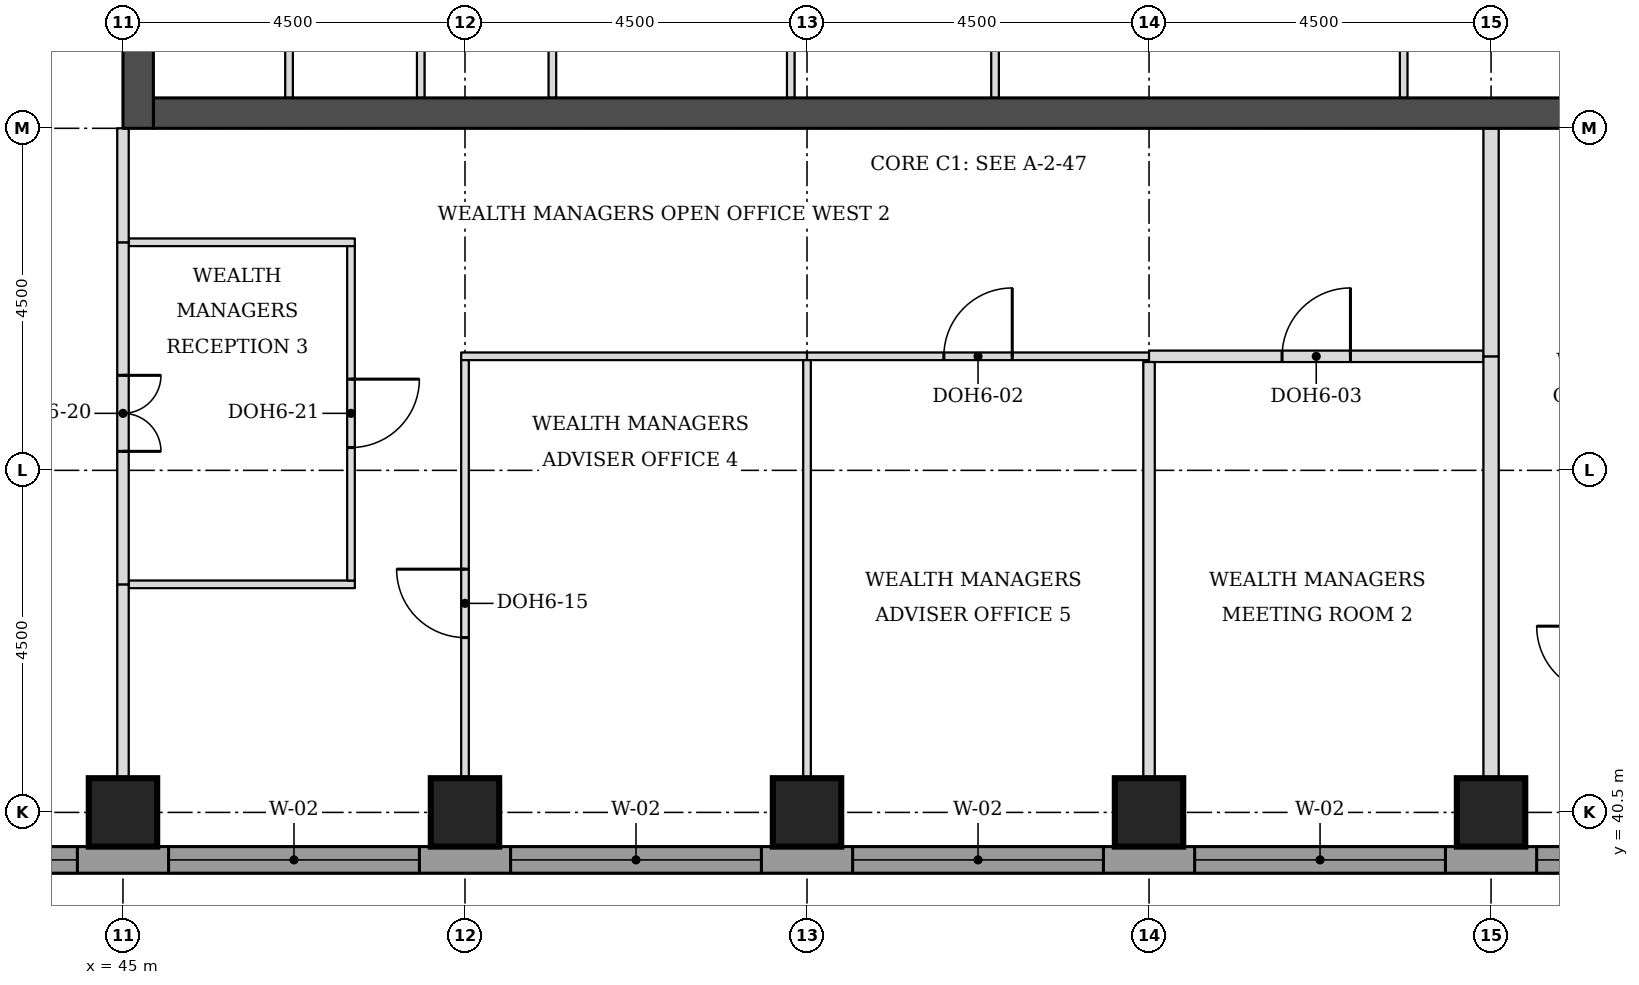
"""IFC4 building model, lengths in metres.
Left out: names, types, materials, properties, quantities, classifications, styles, units other than length and angle.
Written with IfcOpenShell. Run it as: python <this file> out.ifc"""

import sys

from ifc_helpers import new_model, si_unit, direction, frame, frame_2d, origin, origin_2d, place, context, subcontext, project, spatial, rectangle, extrude, element, fill, save


model = new_model("IFC4")
c1 = context("Model", 3, precision=1e-05, world=origin(), true_north=direction((0.0, 1.0)))
c2 = subcontext(c1, "Body", "Model", "MODEL_VIEW")
j1 = project(units=[si_unit("LENGTHUNIT", "METRE"), si_unit("PLANEANGLEUNIT", "RADIAN")], contexts=[c1])
p1 = place(None, origin())
s1 = spatial("IfcSite", under=j1, at=p1, CompositionType="ELEMENT")
p2 = place(p1, origin())
s2 = spatial("IfcBuilding", under=s1, at=p2, CompositionType="ELEMENT")
p3 = place(p2, frame((0.0, 0.0, 188.4)))
s3 = spatial("IfcBuildingStorey", under=s2, at=p3, CompositionType="ELEMENT", Elevation=188.4)
for number, where, z_axis, x_axis in (
    (1, (45.0, 40.5, 0.0), (0.0, 0.0, 1.0), (1.0, 0.0, 0.0)),
    (2, (49.5, 40.5, 0.0), (0.0, 0.0, 1.0), (1.0, 0.0, 0.0)),
    (3, (54.0, 40.5, 0.0), (0.0, 0.0, 1.0), (1.0, 0.0, 0.0)),
    (4, (58.5, 40.5, 0.0), (0.0, 0.0, 1.0), (1.0, 0.0, 0.0)),
    (5, (63.0, 40.5, 0.0), (0.0, 0.0, 1.0), (1.0, 0.0, 0.0)),
):
    element("IfcColumn", number, at=place(p3, frame(where, z_axis=z_axis, x_axis=x_axis)), inside=s3, PredefinedType="COLUMN", context=c2, shape_type="SweptSolid", body=[
        extrude(rectangle(XDim=0.9, YDim=0.9, at=origin_2d()), origin(), (0.0, 0.0, 1.0), 3.7),
    ])
p4 = place(p3, frame((45.4, 49.7, 0.0), z_axis=(0.0, 0.0, 1.0), x_axis=(1.0, 0.0, 0.0)))
e6 = element("IfcWall", 6, at=p4, inside=s3, PredefinedType="SHEAR", context=c2, shape_type="SweptSolid", body=[
    extrude(rectangle(XDim=21.7, YDim=0.4, at=frame_2d((10.85, 0.0))), origin(), (0.0, 0.0, 1.0), 3.7),
])
p5 = place(p3, frame((45.2, 49.5, 0.0), z_axis=(0.0, 0.0, 1.0), x_axis=(0.0, 1.0, 0.0)))
e7 = element("IfcWall", 7, at=p5, inside=s3, PredefinedType="SHEAR", context=c2, shape_type="SweptSolid", body=[
    extrude(rectangle(XDim=22.5, YDim=0.4, at=frame_2d((11.25, 0.0))), origin(), (0.0, 0.0, 1.0), 3.7),
])
p6 = place(p5, frame((4.2, 0.0, 0.0)))
e8 = element("IfcOpeningElement", 8, at=p6, cuts=e7, PredefinedType="OPENING", context=c2, shape_type="SweptSolid", body=[
    extrude(rectangle(XDim=1.8, YDim=2.1, at=frame_2d((0.9, 1.05))), frame((0.0, 0.21, 0.0), z_axis=(0.0, -1.0, 0.0), x_axis=(1.0, 0.0, 0.0)), (0.0, 0.0, 1.0), 0.42),
])
p7 = place(p5, frame((6.9, 0.0, 0.0)))
e9 = element("IfcOpeningElement", 9, at=p7, cuts=e7, PredefinedType="OPENING", context=c2, shape_type="SweptSolid", body=[
    extrude(rectangle(XDim=1.1, YDim=2.1, at=frame_2d((0.55, 1.05))), frame((0.0, 0.21, 0.0), z_axis=(0.0, -1.0, 0.0), x_axis=(1.0, 0.0, 0.0)), (0.0, 0.0, 1.0), 0.42),
])
p8 = place(p5, frame((13.6, 0.0, 0.0)))
e10 = element("IfcOpeningElement", 10, at=p8, cuts=e7, PredefinedType="OPENING", context=c2, shape_type="SweptSolid", body=[
    extrude(rectangle(XDim=1.1, YDim=2.1, at=frame_2d((0.55, 1.05))), frame((0.0, 0.21, 0.0), z_axis=(0.0, -1.0, 0.0), x_axis=(1.0, 0.0, 0.0)), (0.0, 0.0, 1.0), 0.42),
])
p9 = place(p5, frame((16.5, 0.0, 0.0)))
e11 = element("IfcOpeningElement", 11, at=p9, cuts=e7, PredefinedType="OPENING", context=c2, shape_type="SweptSolid", body=[
    extrude(rectangle(XDim=1.8, YDim=2.1, at=frame_2d((0.9, 1.05))), frame((0.0, 0.21, 0.0), z_axis=(0.0, -1.0, 0.0), x_axis=(1.0, 0.0, 0.0)), (0.0, 0.0, 1.0), 0.42),
])
p10 = place(p3, frame((36.0, 39.875, 0.0), z_axis=(0.0, 0.0, 1.0), x_axis=(1.0, 0.0, 0.0)))
e12 = element("IfcWall", 12, at=p10, inside=s3, PredefinedType="STANDARD", context=c2, shape_type="SweptSolid", body=[
    extrude(rectangle(XDim=36.331, YDim=0.35, at=frame_2d((18.166, 0.0))), origin(), (0.0, 0.0, 1.0), 3.525),
])
p11 = place(p10, frame((5.1, 0.0, 0.9)))
e13 = element("IfcOpeningElement", 13, at=p11, cuts=e12, PredefinedType="OPENING", context=c2, shape_type="SweptSolid", body=[
    extrude(rectangle(XDim=3.3, YDim=1.9, at=frame_2d((1.65, 0.95))), frame((0.0, 0.185, 0.0), z_axis=(0.0, -1.0, 0.0), x_axis=(1.0, 0.0, 0.0)), (0.0, 0.0, 1.0), 0.37),
])
p12 = place(p10, frame((9.6, 0.0, 0.9)))
e14 = element("IfcOpeningElement", 14, at=p12, cuts=e12, PredefinedType="OPENING", context=c2, shape_type="SweptSolid", body=[
    extrude(rectangle(XDim=3.3, YDim=1.9, at=frame_2d((1.65, 0.95))), frame((0.0, 0.185, 0.0), z_axis=(0.0, -1.0, 0.0), x_axis=(1.0, 0.0, 0.0)), (0.0, 0.0, 1.0), 0.37),
])
p13 = place(p10, frame((14.1, 0.0, 0.9)))
e15 = element("IfcOpeningElement", 15, at=p13, cuts=e12, PredefinedType="OPENING", context=c2, shape_type="SweptSolid", body=[
    extrude(rectangle(XDim=3.3, YDim=1.9, at=frame_2d((1.65, 0.95))), frame((0.0, 0.185, 0.0), z_axis=(0.0, -1.0, 0.0), x_axis=(1.0, 0.0, 0.0)), (0.0, 0.0, 1.0), 0.37),
])
p14 = place(p10, frame((18.6, 0.0, 0.9)))
e16 = element("IfcOpeningElement", 16, at=p14, cuts=e12, PredefinedType="OPENING", context=c2, shape_type="SweptSolid", body=[
    extrude(rectangle(XDim=3.3, YDim=1.9, at=frame_2d((1.65, 0.95))), frame((0.0, 0.185, 0.0), z_axis=(0.0, -1.0, 0.0), x_axis=(1.0, 0.0, 0.0)), (0.0, 0.0, 1.0), 0.37),
])
p15 = place(p10, frame((23.1, 0.0, 0.9)))
e17 = element("IfcOpeningElement", 17, at=p15, cuts=e12, PredefinedType="OPENING", context=c2, shape_type="SweptSolid", body=[
    extrude(rectangle(XDim=3.3, YDim=1.9, at=frame_2d((1.65, 0.95))), frame((0.0, 0.185, 0.0), z_axis=(0.0, -1.0, 0.0), x_axis=(1.0, 0.0, 0.0)), (0.0, 0.0, 1.0), 0.37),
])
p16 = place(p10, frame((27.6, 0.0, 0.9)))
e18 = element("IfcOpeningElement", 18, at=p16, cuts=e12, PredefinedType="OPENING", context=c2, shape_type="SweptSolid", body=[
    extrude(rectangle(XDim=3.3, YDim=1.9, at=frame_2d((1.65, 0.95))), frame((0.0, 0.185, 0.0), z_axis=(0.0, -1.0, 0.0), x_axis=(1.0, 0.0, 0.0)), (0.0, 0.0, 1.0), 0.37),
])
p17 = place(p3, frame((45.075, 43.5, 0.0), z_axis=(0.0, 0.0, 1.0), x_axis=(1.0, 0.0, 0.0)))
e19 = element("IfcWall", 19, at=p17, inside=s3, PredefinedType="PARTITIONING", context=c2, shape_type="SweptSolid", body=[
    extrude(rectangle(XDim=2.975, YDim=0.1, at=frame_2d((1.488, 0.0))), origin(), (0.0, 0.0, 1.0), 3.55),
])
p18 = place(p3, frame((49.45, 46.5, 0.0), z_axis=(0.0, 0.0, 1.0), x_axis=(1.0, 0.0, 0.0)))
e20 = element("IfcWall", 20, at=p18, inside=s3, PredefinedType="PARTITIONING", context=c2, shape_type="SweptSolid", body=[
    extrude(rectangle(XDim=4.55, YDim=0.1, at=frame_2d((2.275, 0.0))), origin(), (0.0, 0.0, 1.0), 3.55),
])
p19 = place(p3, frame((54.0, 46.5, 0.0), z_axis=(0.0, 0.0, 1.0), x_axis=(1.0, 0.0, 0.0)))
e21 = element("IfcWall", 21, at=p19, inside=s3, PredefinedType="PARTITIONING", context=c2, shape_type="SweptSolid", body=[
    extrude(rectangle(XDim=4.5, YDim=0.1, at=frame_2d((2.25, 0.0))), origin(), (0.0, 0.0, 1.0), 3.55),
])
p20 = place(p19, frame((1.8, 0.0, 0.0)))
e22 = element("IfcOpeningElement", 22, at=p20, cuts=e21, PredefinedType="OPENING", context=c2, shape_type="SweptSolid", body=[
    extrude(rectangle(XDim=0.9, YDim=2.1, at=frame_2d((0.45, 1.05))), frame((0.0, 0.06, 0.0), z_axis=(0.0, -1.0, 0.0), x_axis=(1.0, 0.0, 0.0)), (0.0, 0.0, 1.0), 0.12),
])
p21 = place(p3, frame((58.5, 46.5, 0.0), z_axis=(0.0, 0.0, 1.0), x_axis=(1.0, 0.0, 0.0)))
e23 = element("IfcWall", 23, at=p21, inside=s3, PredefinedType="PARTITIONING", context=c2, shape_type="SweptSolid", body=[
    extrude(rectangle(XDim=4.4, YDim=0.15, at=frame_2d((2.2, 0.0))), origin(), (0.0, 0.0, 1.0), 3.55),
])
p22 = place(p21, frame((1.75, 0.0, 0.0)))
e24 = element("IfcOpeningElement", 24, at=p22, cuts=e23, PredefinedType="OPENING", context=c2, shape_type="SweptSolid", body=[
    extrude(rectangle(XDim=0.9, YDim=2.1, at=frame_2d((0.45, 1.05))), frame((0.0, 0.085, 0.0), z_axis=(0.0, -1.0, 0.0), x_axis=(1.0, 0.0, 0.0)), (0.0, 0.0, 1.0), 0.17),
])
p23 = place(p3, frame((45.075, 48.0, 0.0), z_axis=(0.0, 0.0, 1.0), x_axis=(1.0, 0.0, 0.0)))
e25 = element("IfcWall", 25, at=p23, inside=s3, PredefinedType="PARTITIONING", context=c2, shape_type="SweptSolid", body=[
    extrude(rectangle(XDim=2.975, YDim=0.1, at=frame_2d((1.488, 0.0))), origin(), (0.0, 0.0, 1.0), 3.55),
])
p24 = place(p3, frame((45.0, 40.05, 0.0), z_axis=(0.0, 0.0, 1.0), x_axis=(0.0, 1.0, 0.0)))
e26 = element("IfcWall", 26, at=p24, inside=s3, PredefinedType="PARTITIONING", context=c2, shape_type="SweptSolid", body=[
    extrude(rectangle(XDim=3.45, YDim=0.15, at=frame_2d((1.725, 0.0))), origin(), (0.0, 0.0, 1.0), 3.022),
])
p25 = place(p3, frame((49.5, 40.05, 0.0), z_axis=(0.0, 0.0, 1.0), x_axis=(0.0, 1.0, 0.0)))
e27 = element("IfcWall", 27, at=p25, inside=s3, PredefinedType="PARTITIONING", context=c2, shape_type="SweptSolid", body=[
    extrude(rectangle(XDim=6.4, YDim=0.1, at=frame_2d((3.2, 0.0))), origin(), (0.0, 0.0, 1.0), 3.55),
])
p26 = place(p25, frame((2.75, 0.0, 0.0)))
e28 = element("IfcOpeningElement", 28, at=p26, cuts=e27, PredefinedType="OPENING", context=c2, shape_type="SweptSolid", body=[
    extrude(rectangle(XDim=0.9, YDim=2.1, at=frame_2d((0.45, 1.05))), frame((0.0, 0.06, 0.0), z_axis=(0.0, -1.0, 0.0), x_axis=(1.0, 0.0, 0.0)), (0.0, 0.0, 1.0), 0.12),
])
p27 = place(p3, frame((54.0, 40.05, 0.0), z_axis=(0.0, 0.0, 1.0), x_axis=(0.0, 1.0, 0.0)))
e29 = element("IfcWall", 29, at=p27, inside=s3, PredefinedType="PARTITIONING", context=c2, shape_type="SweptSolid", body=[
    extrude(rectangle(XDim=6.4, YDim=0.1, at=frame_2d((3.2, 0.0))), origin(), (0.0, 0.0, 1.0), 3.55),
])
p28 = place(p3, frame((58.5, 40.05, 0.0), z_axis=(0.0, 0.0, 1.0), x_axis=(0.0, 1.0, 0.0)))
e30 = element("IfcWall", 30, at=p28, inside=s3, PredefinedType="PARTITIONING", context=c2, shape_type="SweptSolid", body=[
    extrude(rectangle(XDim=6.375, YDim=0.15, at=frame_2d((3.188, 0.0))), origin(), (0.0, 0.0, 1.0), 3.55),
])
p29 = place(p3, frame((63.0, 40.05, 0.0), z_axis=(0.0, 0.0, 1.0), x_axis=(0.0, 1.0, 0.0)))
e31 = element("IfcWall", 31, at=p29, inside=s3, PredefinedType="PARTITIONING", context=c2, shape_type="SweptSolid", body=[
    extrude(rectangle(XDim=6.45, YDim=0.2, at=frame_2d((3.225, 0.0))), origin(), (0.0, 0.0, 1.0), 3.55),
])
p30 = place(p3, frame((45.0, 43.5, 0.0), z_axis=(0.0, 0.0, 1.0), x_axis=(0.0, 1.0, 0.0)))
e32 = element("IfcWall", 32, at=p30, inside=s3, PredefinedType="PARTITIONING", context=c2, shape_type="SweptSolid", body=[
    extrude(rectangle(XDim=4.5, YDim=0.15, at=frame_2d((2.25, 0.0))), origin(), (0.0, 0.0, 1.0), 3.022),
])
p31 = place(p30, frame((1.75, 0.0, 0.0)))
e33 = element("IfcOpeningElement", 33, at=p31, cuts=e32, PredefinedType="OPENING", context=c2, shape_type="SweptSolid", body=[
    extrude(rectangle(XDim=1.0, YDim=2.1, at=frame_2d((0.5, 1.05))), frame((0.0, 0.085, 0.0), z_axis=(0.0, -1.0, 0.0), x_axis=(1.0, 0.0, 0.0)), (0.0, 0.0, 1.0), 0.17),
])
p32 = place(p3, frame((48.0, 43.55, 0.0), z_axis=(0.0, 0.0, 1.0), x_axis=(0.0, 1.0, 0.0)))
e34 = element("IfcWall", 34, at=p32, inside=s3, PredefinedType="PARTITIONING", context=c2, shape_type="SweptSolid", body=[
    extrude(rectangle(XDim=4.4, YDim=0.1, at=frame_2d((2.2, 0.0))), origin(), (0.0, 0.0, 1.0), 3.55),
])
p33 = place(p32, frame((1.75, 0.0, 0.0)))
e35 = element("IfcOpeningElement", 35, at=p33, cuts=e34, PredefinedType="OPENING", context=c2, shape_type="SweptSolid", body=[
    extrude(rectangle(XDim=0.9, YDim=2.1, at=frame_2d((0.45, 1.05))), frame((0.0, 0.06, 0.0), z_axis=(0.0, -1.0, 0.0), x_axis=(1.0, 0.0, 0.0)), (0.0, 0.0, 1.0), 0.12),
])
p34 = place(p3, frame((63.0, 46.5, 0.0), z_axis=(0.0, 0.0, 1.0), x_axis=(0.0, 1.0, 0.0)))
e36 = element("IfcWall", 36, at=p34, inside=s3, PredefinedType="PARTITIONING", context=c2, shape_type="SweptSolid", body=[
    extrude(rectangle(XDim=3.0, YDim=0.2, at=frame_2d((1.5, 0.0))), origin(), (0.0, 0.0, 1.0), 3.55),
])
p35 = place(p3, frame((45.0, 48.0, 0.0), z_axis=(0.0, 0.0, 1.0), x_axis=(0.0, 1.0, 0.0)))
e37 = element("IfcWall", 37, at=p35, inside=s3, PredefinedType="PARTITIONING", context=c2, shape_type="SweptSolid", body=[
    extrude(rectangle(XDim=1.5, YDim=0.15, at=frame_2d((0.75, 0.0))), origin(), (0.0, 0.0, 1.0), 3.022),
])
for number, where, z_axis, x_axis in (
    (38, (47.185, 49.9, 0.0), (0.0, 0.0, 1.0), (0.0, 1.0, 0.0)),
    (39, (48.917, 49.9, 0.0), (0.0, 0.0, 1.0), (0.0, 1.0, 0.0)),
    (40, (50.65, 49.9, 0.0), (0.0, 0.0, 1.0), (0.0, 1.0, 0.0)),
    (41, (53.786, 49.9, 0.0), (0.0, 0.0, 1.0), (0.0, 1.0, 0.0)),
    (42, (56.474, 49.9, 0.0), (0.0, 0.0, 1.0), (0.0, 1.0, 0.0)),
    (43, (61.85, 49.9, 0.0), (0.0, 0.0, 1.0), (0.0, 1.0, 0.0)),
):
    element("IfcWall", number, at=place(p3, frame(where, z_axis=z_axis, x_axis=x_axis)), inside=s3, PredefinedType="PARTITIONING", context=c2, shape_type="SweptSolid", body=[
        extrude(rectangle(XDim=3.1, YDim=0.1, at=frame_2d((1.55, 0.0))), origin(), (0.0, 0.0, 1.0), 3.55),
    ])
p36 = place(p11, origin())
e44 = element("IfcWindow", 44, at=p36, inside=s3, PartitioningType="SINGLE_PANEL", PredefinedType="WINDOW", context=c2, shape_type="SweptSolid", body=[
    extrude(rectangle(XDim=3.3, YDim=1.9, at=frame_2d((1.65, 0.95))), frame((0.0, 0.085, 0.0), z_axis=(0.0, -1.0, 0.0), x_axis=(1.0, 0.0, 0.0)), (0.0, 0.0, 1.0), 0.06),
])
fill(e13, e44)
p37 = place(p12, origin())
e45 = element("IfcWindow", 45, at=p37, inside=s3, PartitioningType="SINGLE_PANEL", PredefinedType="WINDOW", context=c2, shape_type="SweptSolid", body=[
    extrude(rectangle(XDim=3.3, YDim=1.9, at=frame_2d((1.65, 0.95))), frame((0.0, 0.085, 0.0), z_axis=(0.0, -1.0, 0.0), x_axis=(1.0, 0.0, 0.0)), (0.0, 0.0, 1.0), 0.06),
])
fill(e14, e45)
p38 = place(p13, origin())
e46 = element("IfcWindow", 46, at=p38, inside=s3, PartitioningType="SINGLE_PANEL", PredefinedType="WINDOW", context=c2, shape_type="SweptSolid", body=[
    extrude(rectangle(XDim=3.3, YDim=1.9, at=frame_2d((1.65, 0.95))), frame((0.0, 0.085, 0.0), z_axis=(0.0, -1.0, 0.0), x_axis=(1.0, 0.0, 0.0)), (0.0, 0.0, 1.0), 0.06),
])
fill(e15, e46)
p39 = place(p14, origin())
e47 = element("IfcWindow", 47, at=p39, inside=s3, PartitioningType="SINGLE_PANEL", PredefinedType="WINDOW", context=c2, shape_type="SweptSolid", body=[
    extrude(rectangle(XDim=3.3, YDim=1.9, at=frame_2d((1.65, 0.95))), frame((0.0, 0.085, 0.0), z_axis=(0.0, -1.0, 0.0), x_axis=(1.0, 0.0, 0.0)), (0.0, 0.0, 1.0), 0.06),
])
fill(e16, e47)
p40 = place(p15, origin())
e48 = element("IfcWindow", 48, at=p40, inside=s3, PartitioningType="SINGLE_PANEL", PredefinedType="WINDOW", context=c2, shape_type="SweptSolid", body=[
    extrude(rectangle(XDim=3.3, YDim=1.9, at=frame_2d((1.65, 0.95))), frame((0.0, 0.085, 0.0), z_axis=(0.0, -1.0, 0.0), x_axis=(1.0, 0.0, 0.0)), (0.0, 0.0, 1.0), 0.06),
])
fill(e17, e48)
p41 = place(p16, origin())
e49 = element("IfcWindow", 49, at=p41, inside=s3, PartitioningType="SINGLE_PANEL", PredefinedType="WINDOW", context=c2, shape_type="SweptSolid", body=[
    extrude(rectangle(XDim=3.3, YDim=1.9, at=frame_2d((1.65, 0.95))), frame((0.0, 0.085, 0.0), z_axis=(0.0, -1.0, 0.0), x_axis=(1.0, 0.0, 0.0)), (0.0, 0.0, 1.0), 0.06),
])
fill(e18, e49)
p42 = place(p31, frame((1.0, 0.0, 0.0), z_axis=(0.0, 0.0, 1.0), x_axis=(-1.0, 0.0, 0.0)))
e50 = element("IfcDoor", 50, at=p42, inside=s3, OperationType="DOUBLE_DOOR_SINGLE_SWING", PredefinedType="DOOR", context=c2, shape_type="SweptSolid", body=[
    extrude(rectangle(XDim=1.0, YDim=2.1, at=frame_2d((0.5, 1.05))), frame((0.0, 0.025, 0.0), z_axis=(0.0, -1.0, 0.0), x_axis=(1.0, 0.0, 0.0)), (0.0, 0.0, 1.0), 0.05),
])
fill(e33, e50)
p43 = place(p33, frame((0.9, 0.0, 0.0), z_axis=(0.0, 0.0, 1.0), x_axis=(-1.0, 0.0, 0.0)))
e51 = element("IfcDoor", 51, at=p43, inside=s3, OperationType="SINGLE_SWING_LEFT", PredefinedType="DOOR", context=c2, shape_type="SweptSolid", body=[
    extrude(rectangle(XDim=0.9, YDim=2.1, at=frame_2d((0.45, 1.05))), frame((0.0, 0.025, 0.0), z_axis=(0.0, -1.0, 0.0), x_axis=(1.0, 0.0, 0.0)), (0.0, 0.0, 1.0), 0.05),
])
fill(e35, e51)
p44 = place(p26, origin())
e52 = element("IfcDoor", 52, at=p44, inside=s3, OperationType="SINGLE_SWING_RIGHT", PredefinedType="DOOR", context=c2, shape_type="SweptSolid", body=[
    extrude(rectangle(XDim=0.9, YDim=2.1, at=frame_2d((0.45, 1.05))), frame((0.0, 0.025, 0.0), z_axis=(0.0, -1.0, 0.0), x_axis=(1.0, 0.0, 0.0)), (0.0, 0.0, 1.0), 0.05),
])
fill(e28, e52)
p45 = place(p20, origin())
e53 = element("IfcDoor", 53, at=p45, inside=s3, OperationType="SINGLE_SWING_RIGHT", PredefinedType="DOOR", context=c2, shape_type="SweptSolid", body=[
    extrude(rectangle(XDim=0.9, YDim=2.1, at=frame_2d((0.45, 1.05))), frame((0.0, 0.025, 0.0), z_axis=(0.0, -1.0, 0.0), x_axis=(1.0, 0.0, 0.0)), (0.0, 0.0, 1.0), 0.05),
])
fill(e22, e53)
p46 = place(p22, origin())
e54 = element("IfcDoor", 54, at=p46, inside=s3, OperationType="SINGLE_SWING_RIGHT", PredefinedType="DOOR", context=c2, shape_type="SweptSolid", body=[
    extrude(rectangle(XDim=0.9, YDim=2.1, at=frame_2d((0.45, 1.05))), frame((0.0, 0.025, 0.0), z_axis=(0.0, -1.0, 0.0), x_axis=(1.0, 0.0, 0.0)), (0.0, 0.0, 1.0), 0.05),
])
fill(e24, e54)
save(model, sys.argv[1])
